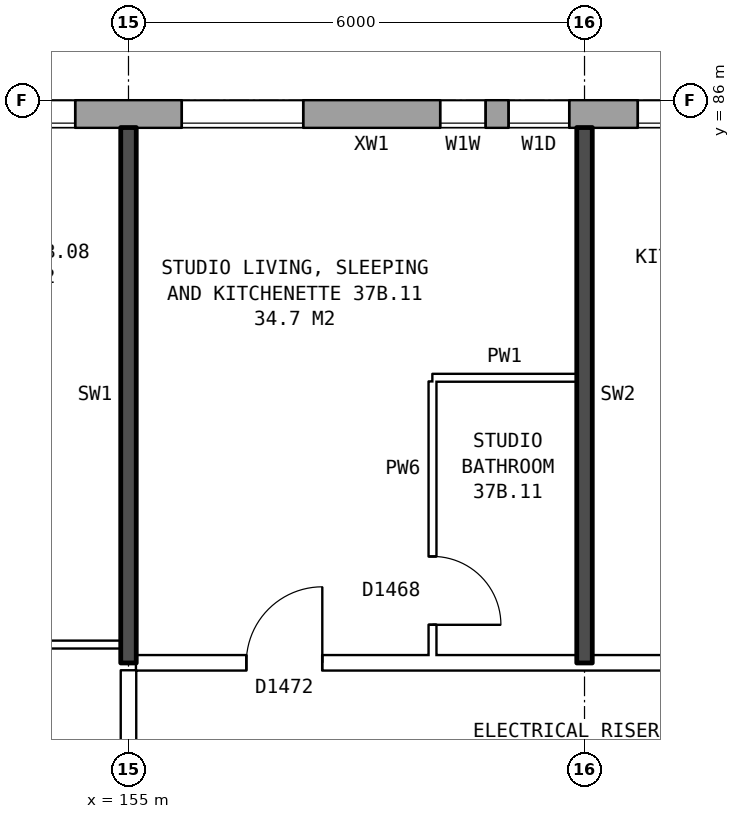
"""IFC4 building model, lengths in metres.
Left out: names, types, materials, properties, quantities, classifications, styles, units other than length and angle.
Written with IfcOpenShell. Run it as: python <this file> out.ifc"""

import sys

from ifc_helpers import new_model, si_unit, direction, frame, frame_2d, origin, place, context, subcontext, project, spatial, rectangle, extrude, element, fill, save


model = new_model("IFC4")
c1 = context("Model", 3, precision=1e-05, world=origin(), true_north=direction((0.0, 1.0)))
c2 = subcontext(c1, "Body", "Model", "MODEL_VIEW")
j1 = project(units=[si_unit("LENGTHUNIT", "METRE"), si_unit("PLANEANGLEUNIT", "RADIAN")], contexts=[c1])
p1 = place(None, origin())
s1 = spatial("IfcSite", under=j1, at=p1, CompositionType="ELEMENT")
p2 = place(p1, origin())
s2 = spatial("IfcBuilding", under=s1, at=p2, CompositionType="ELEMENT")
p3 = place(p2, frame((0.0, 0.0, 133.0)))
s3 = spatial("IfcBuildingStorey", under=s2, at=p3, CompositionType="ELEMENT", Elevation=133.0)
p4 = place(p3, frame((169.675, 85.82, 0.0), z_axis=(0.0, 0.0, 1.0), x_axis=(-1.0, 0.0, 0.0)))
e1 = element("IfcWall", 1, at=p4, inside=s3, PredefinedType="STANDARD", context=c2, shape_type="SweptSolid", body=[
    extrude(rectangle(XDim=35.601, YDim=0.36, at=frame_2d((17.8, 0.0))), origin(), (0.0, 0.0, 1.0), 2.85),
])
p5 = place(p4, frame((0.375, 0.0, 0.8)))
e2 = element("IfcOpeningElement", 2, at=p5, cuts=e1, PredefinedType="OPENING", context=c2, shape_type="SweptSolid", body=[
    extrude(rectangle(XDim=1.6, YDim=1.8, at=frame_2d((0.8, 0.9))), frame((0.0, 0.19, 0.0), z_axis=(0.0, -1.0, 0.0), x_axis=(1.0, 0.0, 0.0)), (0.0, 0.0, 1.0), 0.38),
])
p6 = place(p4, frame((3.375, 0.0, 0.8)))
e3 = element("IfcOpeningElement", 3, at=p6, cuts=e1, PredefinedType="OPENING", context=c2, shape_type="SweptSolid", body=[
    extrude(rectangle(XDim=1.6, YDim=1.8, at=frame_2d((0.8, 0.9))), frame((0.0, 0.19, 0.0), z_axis=(0.0, -1.0, 0.0), x_axis=(1.0, 0.0, 0.0)), (0.0, 0.0, 1.0), 0.38),
])
p7 = place(p4, frame((6.375, 0.0, 0.8)))
e4 = element("IfcOpeningElement", 4, at=p7, cuts=e1, PredefinedType="OPENING", context=c2, shape_type="SweptSolid", body=[
    extrude(rectangle(XDim=1.6, YDim=1.8, at=frame_2d((0.8, 0.9))), frame((0.0, 0.19, 0.0), z_axis=(0.0, -1.0, 0.0), x_axis=(1.0, 0.0, 0.0)), (0.0, 0.0, 1.0), 0.38),
])
p8 = place(p4, frame((8.875, 0.0, 0.8)))
e5 = element("IfcOpeningElement", 5, at=p8, cuts=e1, PredefinedType="OPENING", context=c2, shape_type="SweptSolid", body=[
    extrude(rectangle(XDim=0.8, YDim=1.8, at=frame_2d((0.4, 0.9))), frame((0.0, 0.19, 0.0), z_axis=(0.0, -1.0, 0.0), x_axis=(1.0, 0.0, 0.0)), (0.0, 0.0, 1.0), 0.38),
])
p9 = place(p4, frame((12.375, 0.0, 0.8)))
e6 = element("IfcOpeningElement", 6, at=p9, cuts=e1, PredefinedType="OPENING", context=c2, shape_type="SweptSolid", body=[
    extrude(rectangle(XDim=1.6, YDim=1.8, at=frame_2d((0.8, 0.9))), frame((0.0, 0.19, 0.0), z_axis=(0.0, -1.0, 0.0), x_axis=(1.0, 0.0, 0.0)), (0.0, 0.0, 1.0), 0.38),
])
p10 = place(p4, frame((15.375, 0.0, 0.8)))
e7 = element("IfcOpeningElement", 7, at=p10, cuts=e1, PredefinedType="OPENING", context=c2, shape_type="SweptSolid", body=[
    extrude(rectangle(XDim=1.6, YDim=1.8, at=frame_2d((0.8, 0.9))), frame((0.0, 0.19, 0.0), z_axis=(0.0, -1.0, 0.0), x_axis=(1.0, 0.0, 0.0)), (0.0, 0.0, 1.0), 0.38),
])
p11 = place(p4, frame((18.375, 0.0, 0.8)))
e8 = element("IfcOpeningElement", 8, at=p11, cuts=e1, PredefinedType="OPENING", context=c2, shape_type="SweptSolid", body=[
    extrude(rectangle(XDim=1.6, YDim=1.8, at=frame_2d((0.8, 0.9))), frame((0.0, 0.19, 0.0), z_axis=(0.0, -1.0, 0.0), x_axis=(1.0, 0.0, 0.0)), (0.0, 0.0, 1.0), 0.38),
])
p12 = place(p4, frame((21.375, 0.0, 0.8)))
e9 = element("IfcOpeningElement", 9, at=p12, cuts=e1, PredefinedType="OPENING", context=c2, shape_type="SweptSolid", body=[
    extrude(rectangle(XDim=1.6, YDim=1.8, at=frame_2d((0.8, 0.9))), frame((0.0, 0.19, 0.0), z_axis=(0.0, -1.0, 0.0), x_axis=(1.0, 0.0, 0.0)), (0.0, 0.0, 1.0), 0.38),
])
p13 = place(p4, frame((23.825, 0.0, 0.15)))
e10 = element("IfcOpeningElement", 10, at=p13, cuts=e1, PredefinedType="OPENING", context=c2, shape_type="SweptSolid", body=[
    extrude(rectangle(XDim=0.6, YDim=0.9, at=frame_2d((0.3, 0.45))), frame((0.0, 0.19, 0.0), z_axis=(0.0, -1.0, 0.0), x_axis=(1.0, 0.0, 0.0)), (0.0, 0.0, 1.0), 0.38),
])
p14 = place(p4, frame((27.375, 0.0, 0.8)))
e11 = element("IfcOpeningElement", 11, at=p14, cuts=e1, PredefinedType="OPENING", context=c2, shape_type="SweptSolid", body=[
    extrude(rectangle(XDim=1.6, YDim=1.8, at=frame_2d((0.8, 0.9))), frame((0.0, 0.19, 0.0), z_axis=(0.0, -1.0, 0.0), x_axis=(1.0, 0.0, 0.0)), (0.0, 0.0, 1.0), 0.38),
])
p15 = place(p4, frame((30.375, 0.0, 0.8)))
e12 = element("IfcOpeningElement", 12, at=p15, cuts=e1, PredefinedType="OPENING", context=c2, shape_type="SweptSolid", body=[
    extrude(rectangle(XDim=1.6, YDim=1.8, at=frame_2d((0.8, 0.9))), frame((0.0, 0.19, 0.0), z_axis=(0.0, -1.0, 0.0), x_axis=(1.0, 0.0, 0.0)), (0.0, 0.0, 1.0), 0.38),
])
p16 = place(p4, frame((33.375, 0.0, 0.8)))
e13 = element("IfcOpeningElement", 13, at=p16, cuts=e1, PredefinedType="OPENING", context=c2, shape_type="SweptSolid", body=[
    extrude(rectangle(XDim=1.6, YDim=1.8, at=frame_2d((0.8, 0.9))), frame((0.0, 0.19, 0.0), z_axis=(0.0, -1.0, 0.0), x_axis=(1.0, 0.0, 0.0)), (0.0, 0.0, 1.0), 0.38),
])
p17 = place(p4, frame((9.975, 0.0, 1.7)))
e14 = element("IfcOpeningElement", 14, at=p17, cuts=e1, PredefinedType="OPENING", context=c2, shape_type="SweptSolid", body=[
    extrude(rectangle(XDim=0.6, YDim=0.9, at=frame_2d((0.3, 0.45))), frame((0.0, 0.19, 0.0), z_axis=(0.0, -1.0, 0.0), x_axis=(1.0, 0.0, 0.0)), (0.0, 0.0, 1.0), 0.38),
])
p18 = place(p4, frame((25.275, 0.0, 1.35)))
e15 = element("IfcOpeningElement", 15, at=p18, cuts=e1, PredefinedType="OPENING", context=c2, shape_type="SweptSolid", body=[
    extrude(rectangle(XDim=1.2, YDim=1.2, at=frame_2d((0.6, 0.6))), frame((0.0, 0.19, 0.0), z_axis=(0.0, -1.0, 0.0), x_axis=(1.0, 0.0, 0.0)), (0.0, 0.0, 1.0), 0.38),
])
p19 = place(p3, frame((155.1, 78.6, 0.0), z_axis=(0.0, 0.0, 1.0), x_axis=(1.0, 0.0, 0.0)))
e16 = element("IfcWall", 16, at=p19, inside=s3, PredefinedType="PARTITIONING", context=c2, shape_type="SweptSolid", body=[
    extrude(rectangle(XDim=17.29, YDim=0.2, at=frame_2d((8.645, 0.0))), origin(), (0.0, 0.0, 1.0), 2.85),
])
p20 = place(p19, frame((1.45, 0.0, 0.0)))
e17 = element("IfcOpeningElement", 17, at=p20, cuts=e16, PredefinedType="OPENING", context=c2, shape_type="SweptSolid", body=[
    extrude(rectangle(XDim=1.0, YDim=2.1, at=frame_2d((0.5, 1.05))), frame((0.0, 0.11, 0.0), z_axis=(0.0, -1.0, 0.0), x_axis=(1.0, 0.0, 0.0)), (0.0, 0.0, 1.0), 0.22),
])
p21 = place(p19, frame((8.4, 0.0, 0.0)))
e18 = element("IfcOpeningElement", 18, at=p21, cuts=e16, PredefinedType="OPENING", context=c2, shape_type="SweptSolid", body=[
    extrude(rectangle(XDim=1.0, YDim=2.1, at=frame_2d((0.5, 1.05))), frame((0.0, 0.11, 0.0), z_axis=(0.0, -1.0, 0.0), x_axis=(1.0, 0.0, 0.0)), (0.0, 0.0, 1.0), 0.22),
])
p22 = place(p3, frame((152.0, 78.84, 0.0), z_axis=(0.0, 0.0, 1.0), x_axis=(1.0, 0.0, 0.0)))
e19 = element("IfcWall", 19, at=p22, inside=s3, PredefinedType="PARTITIONING", context=c2, shape_type="SweptSolid", body=[
    extrude(rectangle(XDim=2.9, YDim=0.1, at=frame_2d((1.45, 0.0))), origin(), (0.0, 0.0, 1.0), 2.85),
])
p23 = place(p22, frame((1.0, 0.0, 0.0)))
e20 = element("IfcOpeningElement", 20, at=p23, cuts=e19, PredefinedType="OPENING", context=c2, shape_type="SweptSolid", body=[
    extrude(rectangle(XDim=0.9, YDim=2.1, at=frame_2d((0.45, 1.05))), frame((0.0, 0.06, 0.0), z_axis=(0.0, -1.0, 0.0), x_axis=(1.0, 0.0, 0.0)), (0.0, 0.0, 1.0), 0.12),
])
p24 = place(p3, frame((159.0, 82.35, 0.0), z_axis=(0.0, 0.0, 1.0), x_axis=(1.0, 0.0, 0.0)))
e21 = element("IfcWall", 21, at=p24, inside=s3, PredefinedType="PARTITIONING", context=c2, shape_type="SweptSolid", body=[
    extrude(rectangle(XDim=1.9, YDim=0.1, at=frame_2d((0.95, 0.0))), origin(), (0.0, 0.0, 1.0), 2.85),
])
p25 = place(p3, frame((155.0, 76.3, 0.0), z_axis=(0.0, 0.0, 1.0), x_axis=(0.0, 1.0, 0.0)))
e22 = element("IfcWall", 22, at=p25, inside=s3, PredefinedType="PARTITIONING", context=c2, shape_type="SweptSolid", body=[
    extrude(rectangle(XDim=2.2, YDim=0.2, at=frame_2d((1.1, 0.0))), origin(), (0.0, 0.0, 1.0), 2.85),
])
p26 = place(p3, frame((155.0, 78.6, 0.0), z_axis=(0.0, 0.0, 1.0), x_axis=(0.0, 1.0, 0.0)))
e23 = element("IfcWall", 23, at=p26, inside=s3, PredefinedType="SOLIDWALL", context=c2, shape_type="SweptSolid", body=[
    extrude(rectangle(XDim=7.04, YDim=0.2, at=frame_2d((3.52, 0.0))), origin(), (0.0, 0.0, 1.0), 2.85),
])
p27 = place(p3, frame((159.0, 78.7, 0.0), z_axis=(0.0, 0.0, 1.0), x_axis=(0.0, 1.0, 0.0)))
e24 = element("IfcWall", 24, at=p27, inside=s3, PredefinedType="PARTITIONING", context=c2, shape_type="SweptSolid", body=[
    extrude(rectangle(XDim=3.6, YDim=0.1, at=frame_2d((1.8, 0.0))), origin(), (0.0, 0.0, 1.0), 2.85),
])
p28 = place(p27, frame((0.4, 0.0, 0.0)))
e25 = element("IfcOpeningElement", 25, at=p28, cuts=e24, PredefinedType="OPENING", context=c2, shape_type="SweptSolid", body=[
    extrude(rectangle(XDim=0.9, YDim=2.1, at=frame_2d((0.45, 1.05))), frame((0.0, 0.06, 0.0), z_axis=(0.0, -1.0, 0.0), x_axis=(1.0, 0.0, 0.0)), (0.0, 0.0, 1.0), 0.12),
])
p29 = place(p3, frame((161.0, 78.6, 0.0), z_axis=(0.0, 0.0, 1.0), x_axis=(0.0, 1.0, 0.0)))
e26 = element("IfcWall", 26, at=p29, inside=s3, PredefinedType="SOLIDWALL", context=c2, shape_type="SweptSolid", body=[
    extrude(rectangle(XDim=7.04, YDim=0.2, at=frame_2d((3.52, 0.0))), origin(), (0.0, 0.0, 1.0), 2.85),
])
p30 = place(p7, origin())
e27 = element("IfcWindow", 27, at=p30, inside=s3, PartitioningType="SINGLE_PANEL", PredefinedType="WINDOW", context=c2, shape_type="SweptSolid", body=[
    extrude(rectangle(XDim=1.6, YDim=1.8, at=frame_2d((0.8, 0.9))), frame((0.0, 0.15, 0.0), z_axis=(0.0, -1.0, 0.0), x_axis=(1.0, 0.0, 0.0)), (0.0, 0.0, 1.0), 0.06),
])
fill(e4, e27)
p31 = place(p8, origin())
e28 = element("IfcWindow", 28, at=p31, inside=s3, PartitioningType="SINGLE_PANEL", PredefinedType="WINDOW", context=c2, shape_type="SweptSolid", body=[
    extrude(rectangle(XDim=0.8, YDim=1.8, at=frame_2d((0.4, 0.9))), frame((0.0, 0.15, 0.0), z_axis=(0.0, -1.0, 0.0), x_axis=(1.0, 0.0, 0.0)), (0.0, 0.0, 1.0), 0.06),
])
fill(e5, e28)
p32 = place(p9, origin())
e29 = element("IfcWindow", 29, at=p32, inside=s3, PartitioningType="SINGLE_PANEL", PredefinedType="WINDOW", context=c2, shape_type="SweptSolid", body=[
    extrude(rectangle(XDim=1.6, YDim=1.8, at=frame_2d((0.8, 0.9))), frame((0.0, 0.15, 0.0), z_axis=(0.0, -1.0, 0.0), x_axis=(1.0, 0.0, 0.0)), (0.0, 0.0, 1.0), 0.06),
])
fill(e6, e29)
p33 = place(p10, origin())
e30 = element("IfcWindow", 30, at=p33, inside=s3, PartitioningType="SINGLE_PANEL", PredefinedType="WINDOW", context=c2, shape_type="SweptSolid", body=[
    extrude(rectangle(XDim=1.6, YDim=1.8, at=frame_2d((0.8, 0.9))), frame((0.0, 0.15, 0.0), z_axis=(0.0, -1.0, 0.0), x_axis=(1.0, 0.0, 0.0)), (0.0, 0.0, 1.0), 0.06),
])
fill(e7, e30)
p34 = place(p20, origin())
e31 = element("IfcDoor", 31, at=p34, inside=s3, OperationType="SINGLE_SWING_RIGHT", PredefinedType="DOOR", context=c2, shape_type="SweptSolid", body=[
    extrude(rectangle(XDim=1.0, YDim=2.1, at=frame_2d((0.5, 1.05))), frame((0.0, 0.025, 0.0), z_axis=(0.0, -1.0, 0.0), x_axis=(1.0, 0.0, 0.0)), (0.0, 0.0, 1.0), 0.05),
])
fill(e17, e31)
p35 = place(p28, frame((0.9, 0.0, 0.0), z_axis=(0.0, 0.0, 1.0), x_axis=(-1.0, 0.0, 0.0)))
e32 = element("IfcDoor", 32, at=p35, inside=s3, OperationType="SINGLE_SWING_RIGHT", PredefinedType="DOOR", context=c2, shape_type="SweptSolid", body=[
    extrude(rectangle(XDim=0.9, YDim=2.1, at=frame_2d((0.45, 1.05))), frame((0.0, 0.025, 0.0), z_axis=(0.0, -1.0, 0.0), x_axis=(1.0, 0.0, 0.0)), (0.0, 0.0, 1.0), 0.05),
])
fill(e25, e32)
p36 = place(p17, origin())
e33 = element("IfcWindow", 33, at=p36, inside=s3, PartitioningType="SINGLE_PANEL", PredefinedType="WINDOW", context=c2, shape_type="SweptSolid", body=[
    extrude(rectangle(XDim=0.6, YDim=0.9, at=frame_2d((0.3, 0.45))), frame((0.0, 0.15, 0.0), z_axis=(0.0, -1.0, 0.0), x_axis=(1.0, 0.0, 0.0)), (0.0, 0.0, 1.0), 0.06),
])
fill(e14, e33)
save(model, sys.argv[1])
